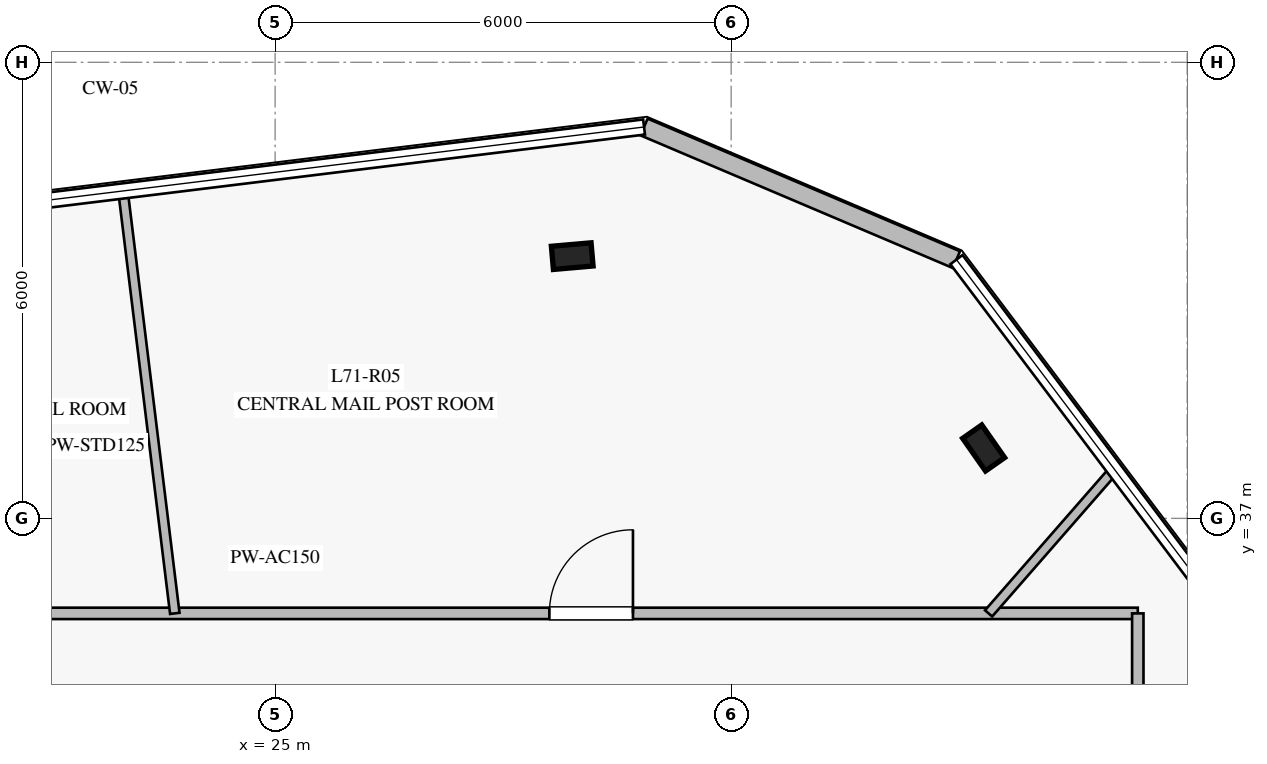
"""IFC4 building model, lengths in metres.
Left out: names, types, materials, properties, quantities, classifications, styles, units other than length and angle.
Written with IfcOpenShell. Run it as: python <this file> out.ifc"""

import sys

from ifc_helpers import new_model, si_unit, direction, frame, frame_2d, origin, origin_2d, place, context, subcontext, project, spatial, rectangle, i_section, extrude, element, fill, save


model = new_model("IFC4")
c1 = context("Model", 3, precision=1e-05, world=origin(), true_north=direction((0.0, 1.0)))
c2 = subcontext(c1, "Body", "Model", "MODEL_VIEW")
j1 = project(units=[si_unit("LENGTHUNIT", "METRE"), si_unit("PLANEANGLEUNIT", "RADIAN")], contexts=[c1])
p1 = place(None, origin())
s1 = spatial("IfcSite", under=j1, at=p1, CompositionType="ELEMENT")
p2 = place(p1, origin())
s2 = spatial("IfcBuilding", under=s1, at=p2, CompositionType="ELEMENT")
p3 = place(p2, frame((0.0, 0.0, 294.2)))
s3 = spatial("IfcBuildingStorey", under=s2, at=p3, CompositionType="ELEMENT", Elevation=294.2)
for number, where, z_axis, x_axis in (
    (1, (28.909, 40.45, 0.0), (0.0, 0.0, 1.0), (0.996, 0.087, 0.0)),
    (2, (34.322, 37.926, 0.0), (0.0, 0.0, 1.0), (-0.574, 0.819, 0.0)),
):
    element("IfcColumn", number, at=place(p3, frame(where, z_axis=z_axis, x_axis=x_axis)), inside=s3, PredefinedType="COLUMN", context=c2, shape_type="SweptSolid", body=[
        extrude(i_section(OverallWidth=0.306, OverallDepth=0.524, WebThickness=0.021, FlangeThickness=0.04, at=origin_2d()), origin(), (0.0, 0.0, 1.0), 4.0),
    ])
p4 = place(p3, frame((33.964, 40.404, 0.0), z_axis=(0.0, 0.0, 1.0), x_axis=(-0.92048584613, 0.390775903908, 0.0)))
e3 = element("IfcWall", 3, at=p4, inside=s3, PredefinedType="STANDARD", context=c2, shape_type="SweptSolid", body=[
    extrude(rectangle(XDim=4.465, YDim=0.24, at=frame_2d((2.232, 0.0))), origin(), (0.0, 0.0, 1.0), 3.78),
])
p5 = place(p3, frame((13.65, 35.75, 0.0), z_axis=(0.0, 0.0, 1.0), x_axis=(1.0, 0.0, 0.0)))
e4 = element("IfcWall", 4, at=p5, inside=s3, PredefinedType="PARTITIONING", context=c2, shape_type="SweptSolid", body=[
    extrude(rectangle(XDim=22.7, YDim=0.15, at=frame_2d((11.35, 0.0))), origin(), (0.0, 0.0, 1.0), 3.02),
])
p6 = place(p5, frame((14.958, 0.0, 0.0)))
e5 = element("IfcOpeningElement", 5, at=p6, cuts=e4, PredefinedType="OPENING", context=c2, shape_type="SweptSolid", body=[
    extrude(rectangle(XDim=1.1, YDim=2.2, at=frame_2d((0.55, 1.1))), frame((0.0, 0.085, 0.0), z_axis=(0.0, -1.0, 0.0), x_axis=(1.0, 0.0, 0.0)), (0.0, 0.0, 1.0), 0.17),
])
p7 = place(p5, frame((4.644, 0.0, 0.0)))
e6 = element("IfcOpeningElement", 6, at=p7, cuts=e4, PredefinedType="OPENING", context=c2, shape_type="SweptSolid", body=[
    extrude(rectangle(XDim=1.1, YDim=2.2, at=frame_2d((0.55, 1.1))), frame((0.0, 0.085, 0.0), z_axis=(0.0, -1.0, 0.0), x_axis=(1.0, 0.0, 0.0)), (0.0, 0.0, 1.0), 0.17),
])
p8 = place(p3, frame((36.35, 35.75, 0.0), z_axis=(0.0, 0.0, 1.0), x_axis=(0.0, -1.0, 0.0)))
e7 = element("IfcWall", 7, at=p8, inside=s3, PredefinedType="PARTITIONING", context=c2, shape_type="SweptSolid", body=[
    extrude(rectangle(XDim=21.5, YDim=0.15, at=frame_2d((10.75, 0.0))), origin(), (0.0, 0.0, 1.0), 3.05),
])
p9 = place(p8, frame((15.411, 0.0, 0.0)))
e8 = element("IfcOpeningElement", 8, at=p9, cuts=e7, PredefinedType="OPENING", context=c2, shape_type="SweptSolid", body=[
    extrude(rectangle(XDim=1.1, YDim=2.2, at=frame_2d((0.55, 1.1))), frame((0.0, 0.085, 0.0), z_axis=(0.0, -1.0, 0.0), x_axis=(1.0, 0.0, 0.0)), (0.0, 0.0, 1.0), 0.17),
])
p10 = place(p8, frame((4.939, 0.0, 0.0)))
e9 = element("IfcOpeningElement", 9, at=p10, cuts=e7, PredefinedType="OPENING", context=c2, shape_type="SweptSolid", body=[
    extrude(rectangle(XDim=1.1, YDim=2.2, at=frame_2d((0.55, 1.1))), frame((0.0, 0.085, 0.0), z_axis=(0.0, -1.0, 0.0), x_axis=(1.0, 0.0, 0.0)), (0.0, 0.0, 1.0), 0.17),
])
p11 = place(p3, frame((23.68, 35.75, 0.0), z_axis=(0.0, 0.0, 1.0), x_axis=(-0.121774165896, 0.992557833338, 0.0)))
e10 = element("IfcWall", 10, at=p11, inside=s3, PredefinedType="PARTITIONING", context=c2, shape_type="SweptSolid", body=[
    extrude(rectangle(XDim=5.583, YDim=0.125, at=frame_2d((2.792, 0.0))), origin(), (0.0, 0.0, 1.0), 3.02),
])
p12 = place(p3, frame((34.387, 35.75, 0.0), z_axis=(0.0, 0.0, 1.0), x_axis=(0.657903000059, 0.753102677271, 0.0)))
e11 = element("IfcWall", 11, at=p12, inside=s3, PredefinedType="PARTITIONING", context=c2, shape_type="SweptSolid", body=[
    extrude(rectangle(XDim=2.5, YDim=0.125, at=frame_2d((1.25, 0.0))), origin(), (0.0, 0.0, 1.0), 3.28),
])
p13 = place(p6, origin())
e12 = element("IfcDoor", 12, at=p13, inside=s3, OperationType="SINGLE_SWING_RIGHT", PredefinedType="DOOR", context=c2, shape_type="SweptSolid", body=[
    extrude(rectangle(XDim=1.1, YDim=2.2, at=frame_2d((0.55, 1.1))), frame((0.0, 0.025, 0.0), z_axis=(0.0, -1.0, 0.0), x_axis=(1.0, 0.0, 0.0)), (0.0, 0.0, 1.0), 0.05),
])
fill(e5, e12)
save(model, sys.argv[1])
